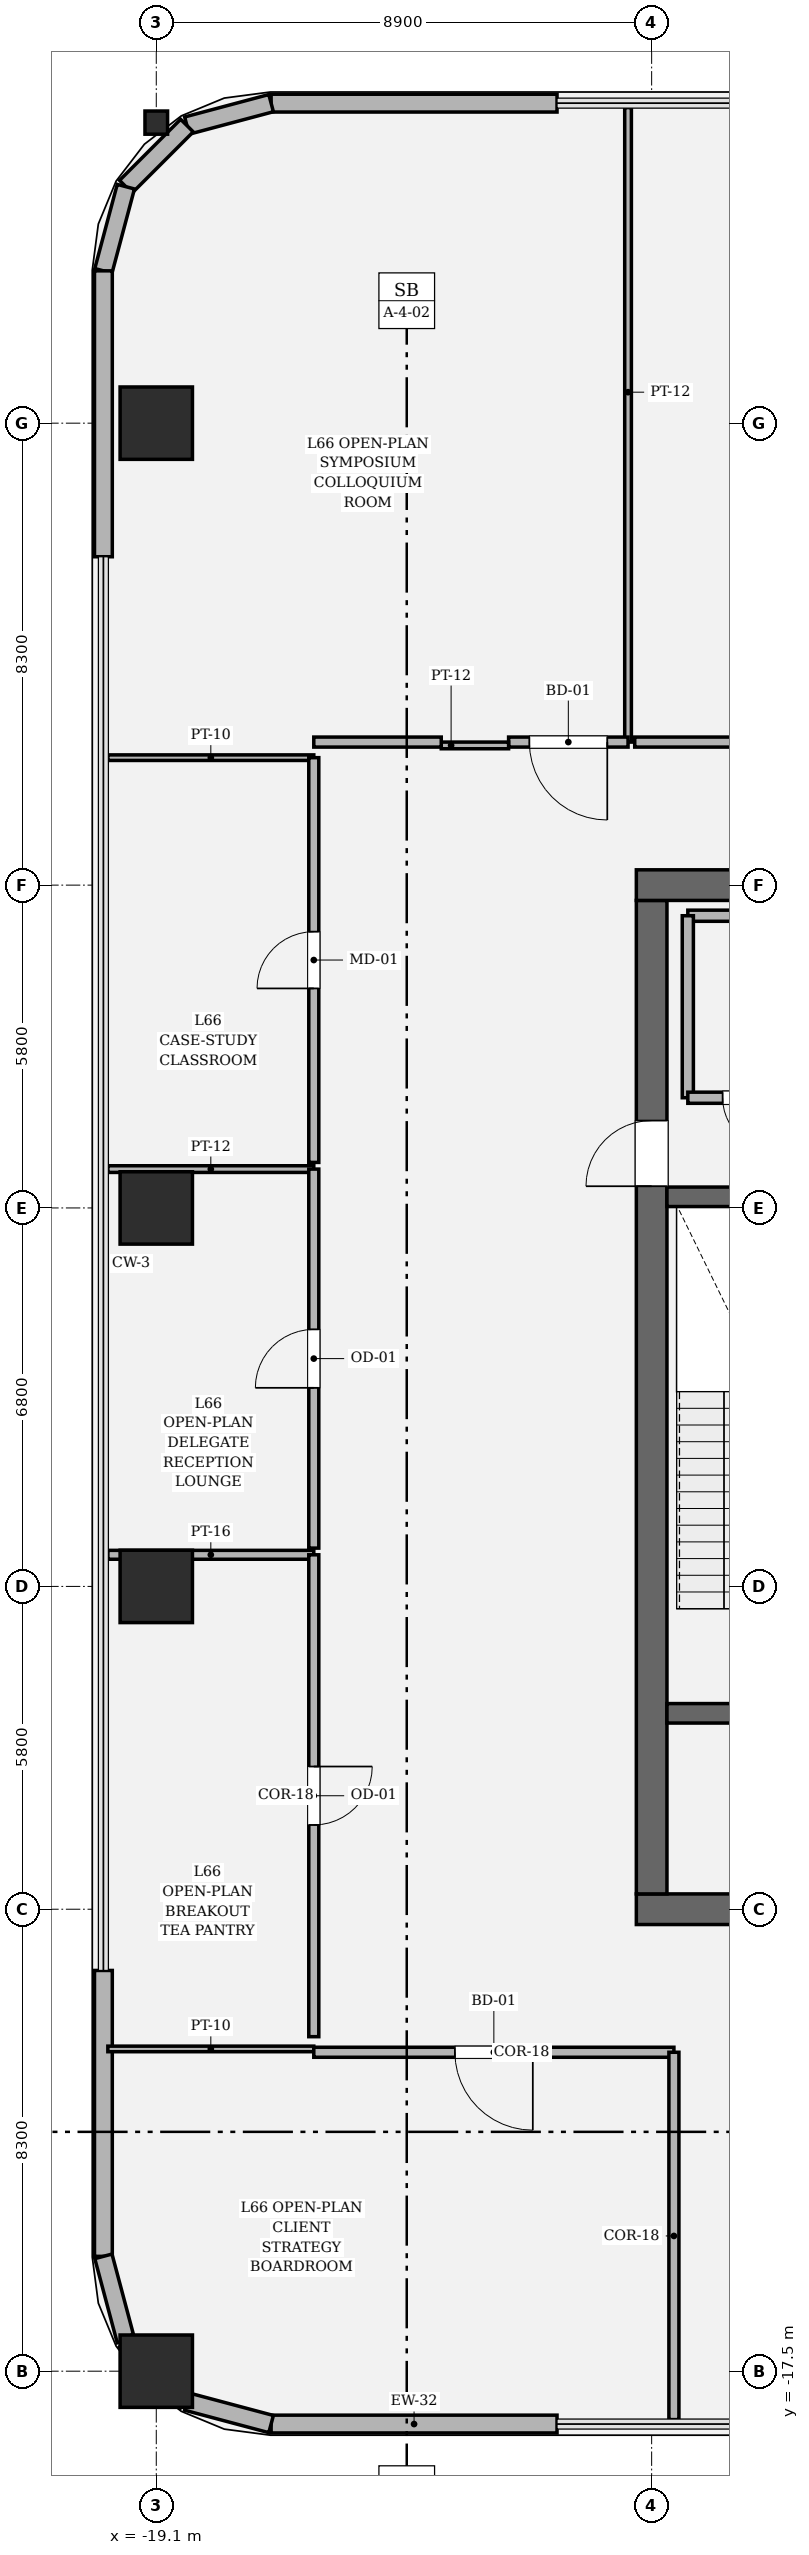
"""IFC4 building model, lengths in metres.
Left out: names, types, materials, properties, quantities, classifications, styles, units other than length and angle.
Written with IfcOpenShell. Run it as: python <this file> out.ifc"""

import sys

from ifc_helpers import new_model, si_unit, direction, frame, frame_2d, origin, origin_2d, place, context, subcontext, project, spatial, rectangle, hollow_rectangle, i_section, extrude, element, fill, save


model = new_model("IFC4")
c1 = context("Model", 3, precision=1e-05, world=origin(), true_north=direction((0.0, 1.0)))
c2 = subcontext(c1, "Body", "Model", "MODEL_VIEW")
j1 = project(units=[si_unit("LENGTHUNIT", "METRE"), si_unit("PLANEANGLEUNIT", "RADIAN")], contexts=[c1])
p1 = place(None, origin())
s1 = spatial("IfcSite", under=j1, at=p1, CompositionType="ELEMENT")
p2 = place(p1, origin())
s2 = spatial("IfcBuilding", under=s1, at=p2, CompositionType="ELEMENT")
p3 = place(p2, frame((0.0, 0.0, 279.75)))
s3 = spatial("IfcBuildingStorey", under=s2, at=p3, CompositionType="ELEMENT", Elevation=279.75)
p4 = place(p3, frame((10.475, -9.2, 0.0), z_axis=(0.0, 0.0, 1.0), x_axis=(-1.0, 0.0, 0.0)))
e1 = element("IfcWall", 1, at=p4, inside=s3, PredefinedType="SHEAR", context=c2, shape_type="SweptSolid", body=[
    extrude(rectangle(XDim=20.95, YDim=0.55, at=frame_2d((10.475, 0.0))), origin(), (0.0, 0.0, 1.0), 4.05),
])
p5 = place(p4, frame((2.75, 0.0, 0.0)))
e2 = element("IfcOpeningElement", 2, at=p5, cuts=e1, PredefinedType="OPENING", context=c2, shape_type="SweptSolid", body=[
    extrude(rectangle(XDim=1.25, YDim=2.25, at=frame_2d((0.625, 1.125))), frame((0.0, 0.285, 0.0), z_axis=(0.0, -1.0, 0.0), x_axis=(1.0, 0.0, 0.0)), (0.0, 0.0, 1.0), 0.57),
])
p6 = place(p4, frame((16.95, 0.0, 0.0)))
e3 = element("IfcOpeningElement", 3, at=p6, cuts=e1, PredefinedType="OPENING", context=c2, shape_type="SweptSolid", body=[
    extrude(rectangle(XDim=1.25, YDim=2.25, at=frame_2d((0.625, 1.125))), frame((0.0, 0.285, 0.0), z_axis=(0.0, -1.0, 0.0), x_axis=(1.0, 0.0, 0.0)), (0.0, 0.0, 1.0), 0.57),
])
p7 = place(p3, frame((-10.2, -8.925, 0.0), z_axis=(0.0, 0.0, 1.0), x_axis=(0.0, 1.0, 0.0)))
e4 = element("IfcWall", 4, at=p7, inside=s3, PredefinedType="SHEAR", context=c2, shape_type="SweptSolid", body=[
    extrude(rectangle(XDim=17.85, YDim=0.55, at=frame_2d((8.925, 0.0))), origin(), (0.0, 0.0, 1.0), 4.05),
])
p8 = place(p7, frame((12.715, 0.0, 0.0)))
e5 = element("IfcOpeningElement", 5, at=p8, cuts=e4, PredefinedType="OPENING", context=c2, shape_type="SweptSolid", body=[
    extrude(rectangle(XDim=1.18, YDim=2.2, at=frame_2d((0.59, 1.1))), frame((0.0, 0.285, 0.0), z_axis=(0.0, -1.0, 0.0), x_axis=(1.0, 0.0, 0.0)), (0.0, 0.0, 1.0), 0.57),
])
p9 = place(p3, frame((-10.475, 9.2, 0.0), z_axis=(0.0, 0.0, 1.0), x_axis=(1.0, 0.0, 0.0)))
e6 = element("IfcWall", 6, at=p9, inside=s3, PredefinedType="SHEAR", context=c2, shape_type="SweptSolid", body=[
    extrude(rectangle(XDim=20.95, YDim=0.55, at=frame_2d((10.475, 0.0))), origin(), (0.0, 0.0, 1.0), 4.05),
])
p10 = place(p3, frame((-9.925, -5.68, 0.0), z_axis=(0.0, 0.0, 1.0), x_axis=(1.0, 0.0, 0.0)))
e7 = element("IfcWall", 7, at=p10, inside=s3, PredefinedType="SOLIDWALL", context=c2, shape_type="SweptSolid", body=[
    extrude(rectangle(XDim=5.275, YDim=0.35, at=frame_2d((2.638, 0.0))), origin(), (0.0, 0.0, 1.0), 4.05),
])
p11 = place(p10, frame((1.385, 0.0, 0.0)))
e8 = element("IfcOpeningElement", 8, at=p11, cuts=e7, PredefinedType="OPENING", context=c2, shape_type="SweptSolid", body=[
    extrude(rectangle(XDim=1.18, YDim=2.2, at=frame_2d((0.59, 1.1))), frame((0.0, 0.185, 0.0), z_axis=(0.0, -1.0, 0.0), x_axis=(1.0, 0.0, 0.0)), (0.0, 0.0, 1.0), 0.37),
])
p12 = place(p3, frame((-9.925, 3.6, 0.0), z_axis=(0.0, 0.0, 1.0), x_axis=(1.0, 0.0, 0.0)))
e9 = element("IfcWall", 9, at=p12, inside=s3, PredefinedType="SOLIDWALL", context=c2, shape_type="SweptSolid", body=[
    extrude(rectangle(XDim=5.275, YDim=0.35, at=frame_2d((2.638, 0.0))), origin(), (0.0, 0.0, 1.0), 4.05),
])
for number, where, z_axis, x_axis in (
    (10, (-19.1, -17.5, 0.0), (0.0, 0.0, 1.0), (1.0, 0.0, 0.0)),
    (11, (-19.1, 17.5, 0.0), (0.0, 0.0, 1.0), (1.0, 0.0, 0.0)),
    (12, (-19.1, 3.4, 0.0), (0.0, 0.0, 1.0), (1.0, 0.0, 0.0)),
    (13, (-19.1, -3.4, 0.0), (0.0, 0.0, 1.0), (1.0, 0.0, 0.0)),
):
    element("IfcColumn", number, at=place(p3, frame(where, z_axis=z_axis, x_axis=x_axis)), inside=s3, PredefinedType="COLUMN", context=c2, shape_type="SweptSolid", body=[
        extrude(hollow_rectangle(XDim=1.3, YDim=1.3, WallThickness=0.038, at=origin_2d()), origin(), (0.0, 0.0, 1.0), 4.05),
    ])
p13 = place(p3, frame((-19.1, 22.9, 0.0), z_axis=(0.0, 0.0, 1.0), x_axis=(1.0, 0.0, 0.0)))
e14 = element("IfcColumn", 14, at=p13, inside=s3, PredefinedType="COLUMN", context=c2, shape_type="SweptSolid", body=[
    extrude(i_section(OverallWidth=0.406, OverallDepth=0.416, WebThickness=0.029, FlangeThickness=0.048, FilletRadius=0.018, at=origin_2d()), origin(), (0.0, 0.0, 1.0), 4.048),
])
p14 = place(p3, frame((-17.037, -18.45, 0.0), z_axis=(0.0, 0.0, 1.0), x_axis=(1.0, 0.0, 0.0)))
e15 = element("IfcWall", 15, at=p14, inside=s3, PredefinedType="SOLIDWALL", context=c2, shape_type="SweptSolid", body=[
    extrude(rectangle(XDim=5.137, YDim=0.32, at=frame_2d((2.568, 0.0))), origin(), (0.0, 0.0, 1.0), 3.77),
])
p15 = place(p3, frame((-11.9, 23.25, 0.0), z_axis=(0.0, 0.0, 1.0), x_axis=(-1.0, 0.0, 0.0)))
e16 = element("IfcWall", 16, at=p15, inside=s3, PredefinedType="SOLIDWALL", context=c2, shape_type="SweptSolid", body=[
    extrude(rectangle(XDim=5.137, YDim=0.32, at=frame_2d((2.568, 0.0))), origin(), (0.0, 0.0, 1.0), 2.444),
])
p16 = place(p3, frame((-17.037, 23.25, 0.0), z_axis=(0.0, 0.0, 1.0), x_axis=(-0.966224582397, -0.257701486942, 0.0)))
e17 = element("IfcWall", 17, at=p16, inside=s3, PredefinedType="SOLIDWALL", context=c2, shape_type="SweptSolid", body=[
    extrude(rectangle(XDim=1.565, YDim=0.32, at=frame_2d((0.783, 0.0))), origin(), (0.0, 0.0, 1.0), 2.444),
])
p17 = place(p3, frame((-18.549, 22.847, 0.0), z_axis=(0.0, 0.0, 1.0), x_axis=(-0.707028130747, -0.707185422879, 0.0)))
e18 = element("IfcWall", 18, at=p17, inside=s3, PredefinedType="SOLIDWALL", context=c2, shape_type="SweptSolid", body=[
    extrude(rectangle(XDim=1.552, YDim=0.32, at=frame_2d((0.776, 0.0))), origin(), (0.0, 0.0, 1.0), 2.444),
])
p18 = place(p3, frame((-19.646, 21.749, 0.0), z_axis=(0.0, 0.0, 1.0), x_axis=(-0.257847112249, -0.966185730957, 0.0)))
e19 = element("IfcWall", 19, at=p18, inside=s3, PredefinedType="SOLIDWALL", context=c2, shape_type="SweptSolid", body=[
    extrude(rectangle(XDim=1.565, YDim=0.32, at=frame_2d((0.783, 0.0))), origin(), (0.0, 0.0, 1.0), 3.77),
])
p19 = place(p3, frame((-20.05, 20.237, 0.0), z_axis=(0.0, 0.0, 1.0), x_axis=(0.0, -1.0, 0.0)))
e20 = element("IfcWall", 20, at=p19, inside=s3, PredefinedType="SOLIDWALL", context=c2, shape_type="SweptSolid", body=[
    extrude(rectangle(XDim=5.137, YDim=0.32, at=frame_2d((2.568, 0.0))), origin(), (0.0, 0.0, 1.0), 2.444),
])
p20 = place(p3, frame((-20.05, -10.3, 0.0), z_axis=(0.0, 0.0, 1.0), x_axis=(0.0, -1.0, 0.0)))
e21 = element("IfcWall", 21, at=p20, inside=s3, PredefinedType="SOLIDWALL", context=c2, shape_type="SweptSolid", body=[
    extrude(rectangle(XDim=5.137, YDim=0.32, at=frame_2d((2.568, 0.0))), origin(), (0.0, 0.0, 1.0), 3.77),
])
p21 = place(p3, frame((-20.05, -15.437, 0.0), z_axis=(0.0, 0.0, 1.0), x_axis=(0.257847112249, -0.966185730957, 0.0)))
e22 = element("IfcWall", 22, at=p21, inside=s3, PredefinedType="SOLIDWALL", context=c2, shape_type="SweptSolid", body=[
    extrude(rectangle(XDim=1.565, YDim=0.32, at=frame_2d((0.783, 0.0))), origin(), (0.0, 0.0, 1.0), 3.77),
])
p22 = place(p3, frame((-19.646, -16.949, 0.0), z_axis=(0.0, 0.0, 1.0), x_axis=(0.707106781187, -0.707106781187, 0.0)))
e23 = element("IfcWall", 23, at=p22, inside=s3, PredefinedType="SOLIDWALL", context=c2, shape_type="SweptSolid", body=[
    extrude(rectangle(XDim=1.552, YDim=0.32, at=frame_2d((0.776, 0.0))), origin(), (0.0, 0.0, 1.0), 2.444),
])
p23 = place(p3, frame((-18.549, -18.047, 0.0), z_axis=(0.0, 0.0, 1.0), x_axis=(0.966224582397, -0.257701486942, 0.0)))
e24 = element("IfcWall", 24, at=p23, inside=s3, PredefinedType="SOLIDWALL", context=c2, shape_type="SweptSolid", body=[
    extrude(rectangle(XDim=1.565, YDim=0.32, at=frame_2d((0.783, 0.0))), origin(), (0.0, 0.0, 1.0), 3.77),
])
p24 = place(p3, frame((-7.38, 8.65, 0.0), z_axis=(0.0, 0.0, 1.0), x_axis=(-1.0, 0.0, 0.0)))
e25 = element("IfcWall", 25, at=p24, inside=s3, PredefinedType="SOLIDWALL", context=c2, shape_type="SweptSolid", body=[
    extrude(rectangle(XDim=2.17, YDim=0.2, at=frame_2d((1.085, 0.0))), origin(), (0.0, 0.0, 1.0), 3.77),
])
p25 = place(p3, frame((-9.55, 8.65, 0.0), z_axis=(0.0, 0.0, 1.0), x_axis=(0.0, -1.0, 0.0)))
e26 = element("IfcWall", 26, at=p25, inside=s3, PredefinedType="SOLIDWALL", context=c2, shape_type="SweptSolid", body=[
    extrude(rectangle(XDim=3.27, YDim=0.2, at=frame_2d((1.635, 0.0))), origin(), (0.0, 0.0, 1.0), 3.77),
])
p26 = place(p3, frame((-9.55, 5.38, 0.0), z_axis=(0.0, 0.0, 1.0), x_axis=(1.0, 0.0, 0.0)))
e27 = element("IfcWall", 27, at=p26, inside=s3, PredefinedType="SOLIDWALL", context=c2, shape_type="SweptSolid", body=[
    extrude(rectangle(XDim=2.17, YDim=0.2, at=frame_2d((1.085, 0.0))), origin(), (0.0, 0.0, 1.0), 3.77),
])
p27 = place(p26, frame((0.625, 0.0, 0.0)))
e28 = element("IfcOpeningElement", 28, at=p27, cuts=e27, PredefinedType="OPENING", context=c2, shape_type="SweptSolid", body=[
    extrude(rectangle(XDim=0.92, YDim=2.1, at=frame_2d((0.46, 1.05))), frame((0.0, 0.11, 0.0), z_axis=(0.0, -1.0, 0.0), x_axis=(1.0, 0.0, 0.0)), (0.0, 0.0, 1.0), 0.22),
])
p28 = place(p3, frame((-19.97, -11.71, 0.0), z_axis=(0.0, 0.0, 1.0), x_axis=(1.0, 0.0, 0.0)))
e29 = element("IfcWall", 29, at=p28, inside=s3, PredefinedType="PARTITIONING", context=c2, shape_type="SweptSolid", body=[
    extrude(rectangle(XDim=3.7, YDim=0.1, at=frame_2d((1.85, 0.0))), origin(), (0.0, 0.0, 1.0), 2.444),
])
p29 = place(p3, frame((-16.27, -11.77, 0.0), z_axis=(0.0, 0.0, 1.0), x_axis=(1.0, 0.0, 0.0)))
e30 = element("IfcWall", 30, at=p29, inside=s3, PredefinedType="PARTITIONING", context=c2, shape_type="SweptSolid", body=[
    extrude(rectangle(XDim=6.47, YDim=0.18, at=frame_2d((3.235, 0.0))), origin(), (0.0, 0.0, 1.0), 2.444),
])
p30 = place(p29, frame((2.535, 0.0, 0.0)))
e31 = element("IfcOpeningElement", 31, at=p30, cuts=e30, PredefinedType="OPENING", context=c2, shape_type="SweptSolid", body=[
    extrude(rectangle(XDim=1.4, YDim=2.25, at=frame_2d((0.7, 1.125))), frame((0.0, 0.1, 0.0), z_axis=(0.0, -1.0, 0.0), x_axis=(1.0, 0.0, 0.0)), (0.0, 0.0, 1.0), 0.2),
])
p31 = place(p3, frame((-9.8, -11.77, 0.0), z_axis=(0.0, 0.0, 1.0), x_axis=(0.0, -1.0, 0.0)))
e32 = element("IfcWall", 32, at=p31, inside=s3, PredefinedType="PARTITIONING", context=c2, shape_type="SweptSolid", body=[
    extrude(rectangle(XDim=6.6, YDim=0.18, at=frame_2d((3.3, 0.0))), origin(), (0.0, 0.0, 1.0), 2.444),
])
p32 = place(p3, frame((-19.97, -2.832, 0.0), z_axis=(0.0, 0.0, 1.0), x_axis=(1.0, 0.0, 0.0)))
e33 = element("IfcWall", 33, at=p32, inside=s3, PredefinedType="PARTITIONING", context=c2, shape_type="SweptSolid", body=[
    extrude(rectangle(XDim=3.7, YDim=0.16, at=frame_2d((1.85, 0.0))), origin(), (0.0, 0.0, 1.0), 2.444),
])
p33 = place(p3, frame((-16.27, -2.832, 0.0), z_axis=(0.0, 0.0, 1.0), x_axis=(0.0, -1.0, 0.0)))
e34 = element("IfcWall", 34, at=p33, inside=s3, PredefinedType="PARTITIONING", context=c2, shape_type="SweptSolid", body=[
    extrude(rectangle(XDim=8.658, YDim=0.18, at=frame_2d((4.329, 0.0))), origin(), (0.0, 0.0, 1.0), 2.444),
])
p34 = place(p33, frame((3.804, 0.0, 0.0)))
e35 = element("IfcOpeningElement", 35, at=p34, cuts=e34, PredefinedType="OPENING", context=c2, shape_type="SweptSolid", body=[
    extrude(rectangle(XDim=1.05, YDim=2.2, at=frame_2d((0.525, 1.1))), frame((0.0, 0.1, 0.0), z_axis=(0.0, -1.0, 0.0), x_axis=(1.0, 0.0, 0.0)), (0.0, 0.0, 1.0), 0.2),
])
p35 = place(p3, frame((-19.97, 4.098, 0.0), z_axis=(0.0, 0.0, 1.0), x_axis=(1.0, 0.0, 0.0)))
e36 = element("IfcWall", 36, at=p35, inside=s3, PredefinedType="PARTITIONING", context=c2, shape_type="SweptSolid", body=[
    extrude(rectangle(XDim=3.7, YDim=0.12, at=frame_2d((1.85, 0.0))), origin(), (0.0, 0.0, 1.0), 2.444),
])
p36 = place(p3, frame((-16.27, 4.098, 0.0), z_axis=(0.0, 0.0, 1.0), x_axis=(0.0, -1.0, 0.0)))
e37 = element("IfcWall", 37, at=p36, inside=s3, PredefinedType="PARTITIONING", context=c2, shape_type="SweptSolid", body=[
    extrude(rectangle(XDim=6.81, YDim=0.18, at=frame_2d((3.405, 0.0))), origin(), (0.0, 0.0, 1.0), 2.444),
])
p37 = place(p36, frame((2.88, 0.0, 0.0)))
e38 = element("IfcOpeningElement", 38, at=p37, cuts=e37, PredefinedType="OPENING", context=c2, shape_type="SweptSolid", body=[
    extrude(rectangle(XDim=1.05, YDim=2.2, at=frame_2d((0.525, 1.1))), frame((0.0, 0.1, 0.0), z_axis=(0.0, -1.0, 0.0), x_axis=(1.0, 0.0, 0.0)), (0.0, 0.0, 1.0), 0.2),
])
p38 = place(p3, frame((-19.97, 11.49, 0.0), z_axis=(0.0, 0.0, 1.0), x_axis=(1.0, 0.0, 0.0)))
e39 = element("IfcWall", 39, at=p38, inside=s3, PredefinedType="PARTITIONING", context=c2, shape_type="SweptSolid", body=[
    extrude(rectangle(XDim=3.7, YDim=0.1, at=frame_2d((1.85, 0.0))), origin(), (0.0, 0.0, 1.0), 2.444),
])
p39 = place(p3, frame((-16.27, 11.49, 0.0), z_axis=(0.0, 0.0, 1.0), x_axis=(0.0, -1.0, 0.0)))
e40 = element("IfcWall", 40, at=p39, inside=s3, PredefinedType="PARTITIONING", context=c2, shape_type="SweptSolid", body=[
    extrude(rectangle(XDim=7.272, YDim=0.18, at=frame_2d((3.636, 0.0))), origin(), (0.0, 0.0, 1.0), 2.444),
])
p40 = place(p39, frame((3.126, 0.0, 0.0)))
e41 = element("IfcOpeningElement", 41, at=p40, cuts=e40, PredefinedType="OPENING", context=c2, shape_type="SweptSolid", body=[
    extrude(rectangle(XDim=1.02, YDim=2.2, at=frame_2d((0.51, 1.1))), frame((0.0, 0.1, 0.0), z_axis=(0.0, -1.0, 0.0), x_axis=(1.0, 0.0, 0.0)), (0.0, 0.0, 1.0), 0.2),
])
p41 = place(p3, frame((-10.624, 23.17, 0.0), z_axis=(0.0, 0.0, 1.0), x_axis=(0.0, -1.0, 0.0)))
e42 = element("IfcWall", 42, at=p41, inside=s3, PredefinedType="PARTITIONING", context=c2, shape_type="SweptSolid", body=[
    extrude(rectangle(XDim=11.4, YDim=0.12, at=frame_2d((5.7, 0.0))), origin(), (0.0, 0.0, 1.0), 2.444),
])
p42 = place(p3, frame((-10.624, 11.77, 0.0), z_axis=(0.0, 0.0, 1.0), x_axis=(-1.0, 0.0, 0.0)))
e43 = element("IfcWall", 43, at=p42, inside=s3, PredefinedType="PARTITIONING", context=c2, shape_type="SweptSolid", body=[
    extrude(rectangle(XDim=2.146, YDim=0.18, at=frame_2d((1.073, 0.0))), origin(), (0.0, 0.0, 1.0), 3.77),
])
p43 = place(p42, frame((0.373, 0.0, 0.0)))
e44 = element("IfcOpeningElement", 44, at=p43, cuts=e43, PredefinedType="OPENING", context=c2, shape_type="SweptSolid", body=[
    extrude(rectangle(XDim=1.4, YDim=2.25, at=frame_2d((0.7, 1.125))), frame((0.0, 0.1, 0.0), z_axis=(0.0, -1.0, 0.0), x_axis=(1.0, 0.0, 0.0)), (0.0, 0.0, 1.0), 0.2),
])
p44 = place(p3, frame((-12.77, 11.71, 0.0), z_axis=(0.0, 0.0, 1.0), x_axis=(-1.0, 0.0, 0.0)))
e45 = element("IfcWall", 45, at=p44, inside=s3, PredefinedType="PARTITIONING", context=c2, shape_type="SweptSolid", body=[
    extrude(rectangle(XDim=1.21, YDim=0.12, at=frame_2d((0.605, 0.0))), origin(), (0.0, 0.0, 1.0), 3.77),
])
p45 = place(p3, frame((-13.98, 11.77, 0.0), z_axis=(0.0, 0.0, 1.0), x_axis=(-1.0, 0.0, 0.0)))
e46 = element("IfcWall", 46, at=p45, inside=s3, PredefinedType="PARTITIONING", context=c2, shape_type="SweptSolid", body=[
    extrude(rectangle(XDim=2.29, YDim=0.18, at=frame_2d((1.145, 0.0))), origin(), (0.0, 0.0, 1.0), 3.404),
])
p46 = place(p3, frame((2.34, 11.77, 0.0), z_axis=(0.0, 0.0, 1.0), x_axis=(-1.0, 0.0, 0.0)))
e47 = element("IfcWall", 47, at=p46, inside=s3, PredefinedType="PARTITIONING", context=c2, shape_type="SweptSolid", body=[
    extrude(rectangle(XDim=12.844, YDim=0.18, at=frame_2d((6.422, 0.0))), origin(), (0.0, 0.0, 1.0), 2.444),
])
p47 = place(p46, frame((5.722, 0.0, 0.0)))
e48 = element("IfcOpeningElement", 48, at=p47, cuts=e47, PredefinedType="OPENING", context=c2, shape_type="SweptSolid", body=[
    extrude(rectangle(XDim=1.4, YDim=2.25, at=frame_2d((0.7, 1.125))), frame((0.0, 0.1, 0.0), z_axis=(0.0, -1.0, 0.0), x_axis=(1.0, 0.0, 0.0)), (0.0, 0.0, 1.0), 0.2),
])
p48 = place(p8, origin())
e49 = element("IfcDoor", 49, at=p48, inside=s3, OperationType="SINGLE_SWING_LEFT", PredefinedType="DOOR", context=c2, shape_type="SweptSolid", body=[
    extrude(rectangle(XDim=1.18, YDim=2.2, at=frame_2d((0.59, 1.1))), frame((0.0, 0.025, 0.0), z_axis=(0.0, -1.0, 0.0), x_axis=(1.0, 0.0, 0.0)), (0.0, 0.0, 1.0), 0.05),
])
fill(e5, e49)
p49 = place(p27, origin())
e50 = element("IfcDoor", 50, at=p49, inside=s3, OperationType="SINGLE_SWING_RIGHT", PredefinedType="DOOR", context=c2, shape_type="SweptSolid", body=[
    extrude(rectangle(XDim=0.92, YDim=2.1, at=frame_2d((0.46, 1.05))), frame((0.0, 0.025, 0.0), z_axis=(0.0, -1.0, 0.0), x_axis=(1.0, 0.0, 0.0)), (0.0, 0.0, 1.0), 0.05),
])
fill(e28, e50)
p50 = place(p30, origin())
e51 = element("IfcDoor", 51, at=p50, inside=s3, OperationType="SINGLE_SWING_RIGHT", PredefinedType="DOOR", context=c2, shape_type="SweptSolid", body=[
    extrude(rectangle(XDim=1.4, YDim=2.25, at=frame_2d((0.7, 1.125))), frame((0.0, 0.025, 0.0), z_axis=(0.0, -1.0, 0.0), x_axis=(1.0, 0.0, 0.0)), (0.0, 0.0, 1.0), 0.05),
])
fill(e31, e51)
p51 = place(p34, origin())
e52 = element("IfcDoor", 52, at=p51, inside=s3, OperationType="SINGLE_SWING_LEFT", PredefinedType="DOOR", context=c2, shape_type="SweptSolid", body=[
    extrude(rectangle(XDim=1.05, YDim=2.2, at=frame_2d((0.525, 1.1))), frame((0.0, 0.025, 0.0), z_axis=(0.0, -1.0, 0.0), x_axis=(1.0, 0.0, 0.0)), (0.0, 0.0, 1.0), 0.05),
])
fill(e35, e52)
p52 = place(p37, origin())
e53 = element("IfcDoor", 53, at=p52, inside=s3, OperationType="SINGLE_SWING_RIGHT", PredefinedType="DOOR", context=c2, shape_type="SweptSolid", body=[
    extrude(rectangle(XDim=1.05, YDim=2.2, at=frame_2d((0.525, 1.1))), frame((0.0, 0.025, 0.0), z_axis=(0.0, -1.0, 0.0), x_axis=(1.0, 0.0, 0.0)), (0.0, 0.0, 1.0), 0.05),
])
fill(e38, e53)
p53 = place(p40, origin())
e54 = element("IfcDoor", 54, at=p53, inside=s3, OperationType="SINGLE_SWING_RIGHT", PredefinedType="DOOR", context=c2, shape_type="SweptSolid", body=[
    extrude(rectangle(XDim=1.02, YDim=2.2, at=frame_2d((0.51, 1.1))), frame((0.0, 0.025, 0.0), z_axis=(0.0, -1.0, 0.0), x_axis=(1.0, 0.0, 0.0)), (0.0, 0.0, 1.0), 0.05),
])
fill(e41, e54)
p54 = place(p43, origin())
e55 = element("IfcDoor", 55, at=p54, inside=s3, OperationType="SINGLE_SWING_LEFT", PredefinedType="DOOR", context=c2, shape_type="SweptSolid", body=[
    extrude(rectangle(XDim=1.4, YDim=2.25, at=frame_2d((0.7, 1.125))), frame((0.0, 0.025, 0.0), z_axis=(0.0, -1.0, 0.0), x_axis=(1.0, 0.0, 0.0)), (0.0, 0.0, 1.0), 0.05),
])
fill(e44, e55)
save(model, sys.argv[1])
